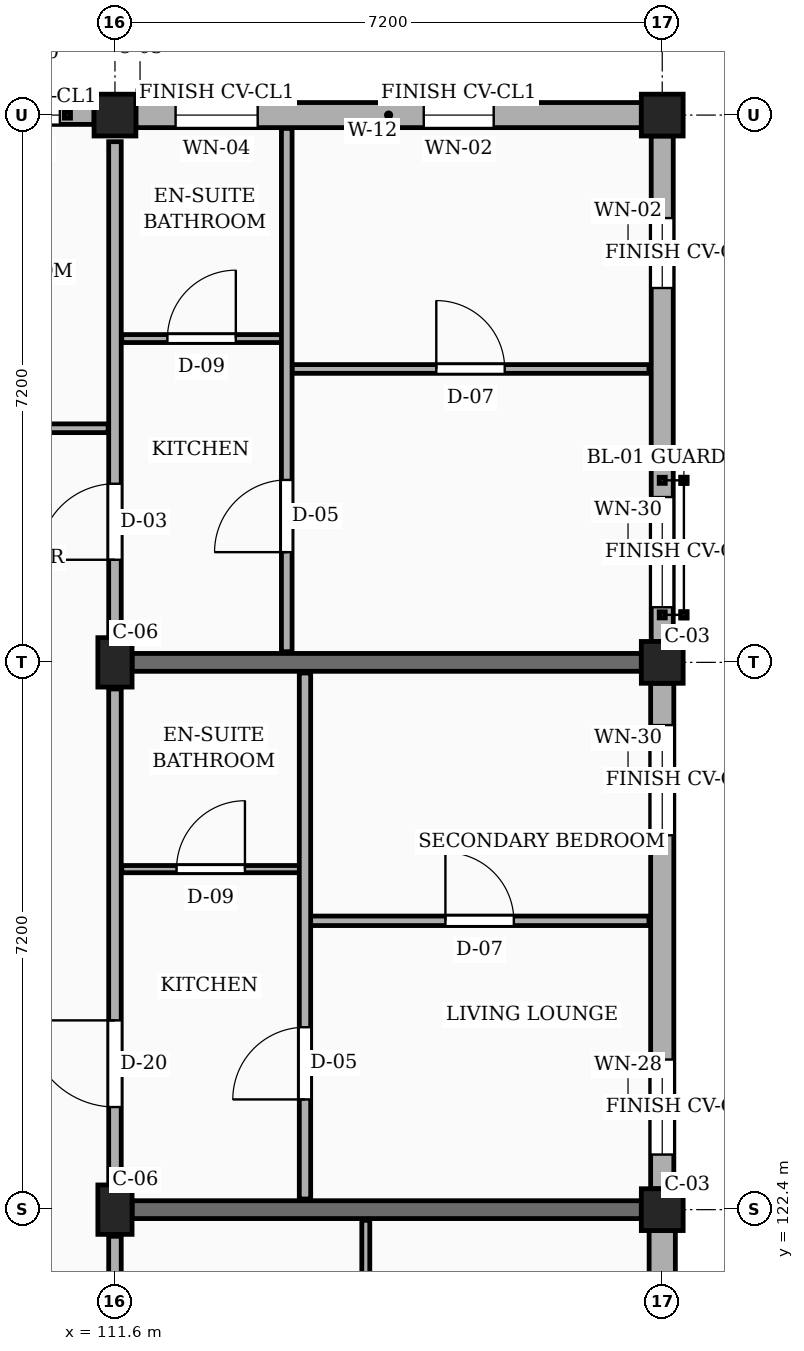
"""IFC4 building model, lengths in metres.
Left out: names, types, materials, properties, quantities, classifications, styles, units other than length and angle.
Written with IfcOpenShell. Run it as: python <this file> out.ifc"""

import sys

from ifc_helpers import new_model, si_unit, direction, frame, frame_2d, origin, origin_2d, place, context, subcontext, project, spatial, rectangle, extrude, element, fill, save


model = new_model("IFC4")
c1 = context("Model", 3, precision=1e-05, world=origin(), true_north=direction((0.0, 1.0)))
c2 = subcontext(c1, "Body", "Model", "MODEL_VIEW")
j1 = project(units=[si_unit("LENGTHUNIT", "METRE"), si_unit("PLANEANGLEUNIT", "RADIAN")], contexts=[c1])
p1 = place(None, origin())
s1 = spatial("IfcSite", under=j1, at=p1, CompositionType="ELEMENT")
p2 = place(p1, origin())
s2 = spatial("IfcBuilding", under=s1, at=p2, CompositionType="ELEMENT")
p3 = place(p2, frame((0.0, 0.0, 13.95)))
s3 = spatial("IfcBuildingStorey", under=s2, at=p3, CompositionType="ELEMENT", Elevation=13.95)
for number, where, z_axis, x_axis in (
    (1, (111.6, 122.4, 0.0), (0.0, 0.0, 1.0), (1.0, 0.0, 0.0)),
    (2, (111.6, 129.6, 0.0), (0.0, 0.0, 1.0), (1.0, 0.0, 0.0)),
):
    element("IfcColumn", number, at=place(p3, frame(where, z_axis=z_axis, x_axis=x_axis)), inside=s3, PredefinedType="COLUMN", context=c2, shape_type="SweptSolid", body=[
        extrude(rectangle(XDim=0.45, YDim=0.65, at=origin_2d()), origin(), (0.0, 0.0, 1.0), 3.15),
    ])
for number, where, z_axis, x_axis in (
    (3, (111.6, 136.8, 0.0), (0.0, 0.0, 1.0), (1.0, 0.0, 0.0)),
    (4, (118.8, 122.4, 0.0), (0.0, 0.0, 1.0), (1.0, 0.0, 0.0)),
    (5, (118.8, 129.6, 0.0), (0.0, 0.0, 1.0), (1.0, 0.0, 0.0)),
    (6, (118.8, 136.8, 0.0), (0.0, 0.0, 1.0), (1.0, 0.0, 0.0)),
):
    element("IfcColumn", number, at=place(p3, frame(where, z_axis=z_axis, x_axis=x_axis)), inside=s3, PredefinedType="COLUMN", context=c2, shape_type="SweptSolid", body=[
        extrude(rectangle(XDim=0.55, YDim=0.55, at=origin_2d()), origin(), (0.0, 0.0, 1.0), 3.15),
    ])
for number, where, z_axis, x_axis in (
    (7, (111.825, 122.4, 0.0), (0.0, 0.0, 1.0), (1.0, 0.0, 0.0)),
    (8, (111.825, 129.6, 0.0), (0.0, 0.0, 1.0), (1.0, 0.0, 0.0)),
):
    element("IfcWall", number, at=place(p3, frame(where, z_axis=z_axis, x_axis=x_axis)), inside=s3, PredefinedType="SOLIDWALL", context=c2, shape_type="SweptSolid", body=[
        extrude(rectangle(XDim=6.7, YDim=0.235, at=frame_2d((3.35, 0.0))), origin(), (0.0, 0.0, 1.0), 2.19),
    ])
p4 = place(p3, frame((118.8, 115.475, 0.0), z_axis=(0.0, 0.0, 1.0), x_axis=(0.0, 1.0, 0.0)))
e9 = element("IfcWall", 9, at=p4, inside=s3, PredefinedType="SOLIDWALL", context=c2, shape_type="SweptSolid", body=[
    extrude(rectangle(XDim=6.65, YDim=0.345, at=frame_2d((3.325, 0.0))), origin(), (0.0, 0.0, 1.0), 2.46),
])
p5 = place(p4, frame((0.45, 0.0, 0.78)))
e10 = element("IfcOpeningElement", 10, at=p5, cuts=e9, PredefinedType="OPENING", context=c2, shape_type="SweptSolid", body=[
    extrude(rectangle(XDim=1.05, YDim=1.44, at=frame_2d((0.525, 0.72))), frame((0.0, 0.183, 0.0), z_axis=(0.0, -1.0, 0.0), x_axis=(1.0, 0.0, 0.0)), (0.0, 0.0, 1.0), 0.365),
])
p6 = place(p4, frame((4.65, 0.0, 0.78)))
e11 = element("IfcOpeningElement", 11, at=p6, cuts=e9, PredefinedType="OPENING", context=c2, shape_type="SweptSolid", body=[
    extrude(rectangle(XDim=1.25, YDim=1.44, at=frame_2d((0.625, 0.72))), frame((0.0, 0.183, 0.0), z_axis=(0.0, -1.0, 0.0), x_axis=(1.0, 0.0, 0.0)), (0.0, 0.0, 1.0), 0.365),
])
p7 = place(p3, frame((118.8, 122.675, 0.0), z_axis=(0.0, 0.0, 1.0), x_axis=(0.0, 1.0, 0.0)))
e12 = element("IfcWall", 12, at=p7, inside=s3, PredefinedType="SOLIDWALL", context=c2, shape_type="SweptSolid", body=[
    extrude(rectangle(XDim=6.65, YDim=0.305, at=frame_2d((3.325, 0.0))), origin(), (0.0, 0.0, 1.0), 2.46),
])
p8 = place(p7, frame((0.45, 0.0, 0.78)))
e13 = element("IfcOpeningElement", 13, at=p8, cuts=e12, PredefinedType="OPENING", context=c2, shape_type="SweptSolid", body=[
    extrude(rectangle(XDim=1.25, YDim=1.44, at=frame_2d((0.625, 0.72))), frame((0.0, 0.163, 0.0), z_axis=(0.0, -1.0, 0.0), x_axis=(1.0, 0.0, 0.0)), (0.0, 0.0, 1.0), 0.325),
])
p9 = place(p7, frame((4.65, 0.0, 0.78)))
e14 = element("IfcOpeningElement", 14, at=p9, cuts=e12, PredefinedType="OPENING", context=c2, shape_type="SweptSolid", body=[
    extrude(rectangle(XDim=1.45, YDim=1.44, at=frame_2d((0.725, 0.72))), frame((0.0, 0.163, 0.0), z_axis=(0.0, -1.0, 0.0), x_axis=(1.0, 0.0, 0.0)), (0.0, 0.0, 1.0), 0.325),
])
p10 = place(p3, frame((118.8, 129.875, 0.0), z_axis=(0.0, 0.0, 1.0), x_axis=(0.0, 1.0, 0.0)))
e15 = element("IfcWall", 15, at=p10, inside=s3, PredefinedType="SOLIDWALL", context=c2, shape_type="SweptSolid", body=[
    extrude(rectangle(XDim=6.65, YDim=0.29, at=frame_2d((3.325, 0.0))), origin(), (0.0, 0.0, 1.0), 2.46),
])
p11 = place(p10, frame((0.45, 0.0, 0.78)))
e16 = element("IfcOpeningElement", 16, at=p11, cuts=e15, PredefinedType="OPENING", context=c2, shape_type="SweptSolid", body=[
    extrude(rectangle(XDim=1.45, YDim=1.44, at=frame_2d((0.725, 0.72))), frame((0.0, 0.155, 0.0), z_axis=(0.0, -1.0, 0.0), x_axis=(1.0, 0.0, 0.0)), (0.0, 0.0, 1.0), 0.31),
])
p12 = place(p10, frame((4.65, 0.0, 0.78)))
e17 = element("IfcOpeningElement", 17, at=p12, cuts=e15, PredefinedType="OPENING", context=c2, shape_type="SweptSolid", body=[
    extrude(rectangle(XDim=0.92, YDim=1.15, at=frame_2d((0.46, 0.575))), frame((0.0, 0.155, 0.0), z_axis=(0.0, -1.0, 0.0), x_axis=(1.0, 0.0, 0.0)), (0.0, 0.0, 1.0), 0.31),
])
p13 = place(p3, frame((118.525, 136.8, 0.0), z_axis=(0.0, 0.0, 1.0), x_axis=(-1.0, 0.0, 0.0)))
e18 = element("IfcWall", 18, at=p13, inside=s3, PredefinedType="SOLIDWALL", context=c2, shape_type="SweptSolid", body=[
    extrude(rectangle(XDim=6.65, YDim=0.33, at=frame_2d((3.325, 0.0))), origin(), (0.0, 0.0, 1.0), 2.46),
])
p14 = place(p13, frame((1.942, 0.0, 0.78)))
e19 = element("IfcOpeningElement", 19, at=p14, cuts=e18, PredefinedType="OPENING", context=c2, shape_type="SweptSolid", body=[
    extrude(rectangle(XDim=0.92, YDim=1.15, at=frame_2d((0.46, 0.575))), frame((0.0, 0.175, 0.0), z_axis=(0.0, -1.0, 0.0), x_axis=(1.0, 0.0, 0.0)), (0.0, 0.0, 1.0), 0.35),
])
p15 = place(p13, frame((5.048, 0.0, 0.78)))
e20 = element("IfcOpeningElement", 20, at=p15, cuts=e18, PredefinedType="OPENING", context=c2, shape_type="SweptSolid", body=[
    extrude(rectangle(XDim=1.08, YDim=1.15, at=frame_2d((0.54, 0.575))), frame((0.0, 0.175, 0.0), z_axis=(0.0, -1.0, 0.0), x_axis=(1.0, 0.0, 0.0)), (0.0, 0.0, 1.0), 0.35),
])
p16 = place(p3, frame((111.325, 136.8, 0.0), z_axis=(0.0, 0.0, 1.0), x_axis=(-1.0, 0.0, 0.0)))
e21 = element("IfcWall", 21, at=p16, inside=s3, PredefinedType="SOLIDWALL", context=c2, shape_type="SweptSolid", body=[
    extrude(rectangle(XDim=6.65, YDim=0.245, at=frame_2d((3.325, 0.0))), origin(), (0.0, 0.0, 1.0), 2.46),
])
p17 = place(p16, frame((0.45, 0.0, 0.78)))
e22 = element("IfcOpeningElement", 22, at=p17, cuts=e21, PredefinedType="OPENING", context=c2, shape_type="SweptSolid", body=[
    extrude(rectangle(XDim=1.08, YDim=1.15, at=frame_2d((0.54, 0.575))), frame((0.0, 0.133, 0.0), z_axis=(0.0, -1.0, 0.0), x_axis=(1.0, 0.0, 0.0)), (0.0, 0.0, 1.0), 0.265),
])
p18 = place(p16, frame((4.65, 0.0, 0.78)))
e23 = element("IfcOpeningElement", 23, at=p18, cuts=e21, PredefinedType="OPENING", context=c2, shape_type="SweptSolid", body=[
    extrude(rectangle(XDim=1.24, YDim=1.15, at=frame_2d((0.62, 0.575))), frame((0.0, 0.133, 0.0), z_axis=(0.0, -1.0, 0.0), x_axis=(1.0, 0.0, 0.0)), (0.0, 0.0, 1.0), 0.265),
])
p19 = place(p3, frame((111.6, 115.55, 0.0), z_axis=(0.0, 0.0, 1.0), x_axis=(0.0, 1.0, 0.0)))
e24 = element("IfcWall", 24, at=p19, inside=s3, PredefinedType="PARTITIONING", context=c2, shape_type="SweptSolid", body=[
    extrude(rectangle(XDim=6.5, YDim=0.165, at=frame_2d((3.25, 0.0))), origin(), (0.0, 0.0, 1.0), 2.325),
])
p20 = place(p19, frame((1.1, 0.0, 0.0)))
e25 = element("IfcOpeningElement", 25, at=p20, cuts=e24, PredefinedType="OPENING", context=c2, shape_type="SweptSolid", body=[
    extrude(rectangle(XDim=0.94, YDim=2.12, at=frame_2d((0.47, 1.06))), frame((0.0, 0.093, 0.0), z_axis=(0.0, -1.0, 0.0), x_axis=(1.0, 0.0, 0.0)), (0.0, 0.0, 1.0), 0.185),
])
p21 = place(p3, frame((111.6, 122.75, 0.0), z_axis=(0.0, 0.0, 1.0), x_axis=(0.0, 1.0, 0.0)))
e26 = element("IfcWall", 26, at=p21, inside=s3, PredefinedType="PARTITIONING", context=c2, shape_type="SweptSolid", body=[
    extrude(rectangle(XDim=6.5, YDim=0.165, at=frame_2d((3.25, 0.0))), origin(), (0.0, 0.0, 1.0), 2.325),
])
p22 = place(p21, frame((1.0, 0.0, 0.0)))
e27 = element("IfcOpeningElement", 27, at=p22, cuts=e26, PredefinedType="OPENING", context=c2, shape_type="SweptSolid", body=[
    extrude(rectangle(XDim=1.14, YDim=2.18, at=frame_2d((0.57, 1.09))), frame((0.0, 0.093, 0.0), z_axis=(0.0, -1.0, 0.0), x_axis=(1.0, 0.0, 0.0)), (0.0, 0.0, 1.0), 0.185),
])
p23 = place(p3, frame((111.6, 129.95, 0.0), z_axis=(0.0, 0.0, 1.0), x_axis=(0.0, 1.0, 0.0)))
e28 = element("IfcWall", 28, at=p23, inside=s3, PredefinedType="PARTITIONING", context=c2, shape_type="SweptSolid", body=[
    extrude(rectangle(XDim=6.5, YDim=0.165, at=frame_2d((3.25, 0.0))), origin(), (0.0, 0.0, 1.0), 2.325),
])
p24 = place(p23, frame((1.0, 0.0, 0.0)))
e29 = element("IfcOpeningElement", 29, at=p24, cuts=e28, PredefinedType="OPENING", context=c2, shape_type="SweptSolid", body=[
    extrude(rectangle(XDim=1.0, YDim=2.15, at=frame_2d((0.5, 1.075))), frame((0.0, 0.093, 0.0), z_axis=(0.0, -1.0, 0.0), x_axis=(1.0, 0.0, 0.0)), (0.0, 0.0, 1.0), 0.185),
])
p25 = place(p3, frame((114.9, 119.07, 0.0), z_axis=(0.0, 0.0, 1.0), x_axis=(0.0, 1.0, 0.0)))
e30 = element("IfcWall", 30, at=p25, inside=s3, PredefinedType="PARTITIONING", context=c2, shape_type="SweptSolid", body=[
    extrude(rectangle(XDim=3.19, YDim=0.105, at=frame_2d((1.595, 0.0))), origin(), (0.0, 0.0, 1.0), 2.325),
])
p26 = place(p3, frame((114.17, 126.2, 0.0), z_axis=(0.0, 0.0, 1.0), x_axis=(1.0, 0.0, 0.0)))
e31 = element("IfcWall", 31, at=p26, inside=s3, PredefinedType="PARTITIONING", context=c2, shape_type="SweptSolid", body=[
    extrude(rectangle(XDim=4.455, YDim=0.125, at=frame_2d((2.228, 0.0))), origin(), (0.0, 0.0, 1.0), 2.325),
])
p27 = place(p26, frame((1.778, 0.0, 0.0)))
e32 = element("IfcOpeningElement", 32, at=p27, cuts=e31, PredefinedType="OPENING", context=c2, shape_type="SweptSolid", body=[
    extrude(rectangle(XDim=0.9, YDim=2.1, at=frame_2d((0.45, 1.05))), frame((0.0, 0.073, 0.0), z_axis=(0.0, -1.0, 0.0), x_axis=(1.0, 0.0, 0.0)), (0.0, 0.0, 1.0), 0.145),
])
p28 = place(p3, frame((111.69, 126.88, 0.0), z_axis=(0.0, 0.0, 1.0), x_axis=(1.0, 0.0, 0.0)))
e33 = element("IfcWall", 33, at=p28, inside=s3, PredefinedType="PARTITIONING", context=c2, shape_type="SweptSolid", body=[
    extrude(rectangle(XDim=2.34, YDim=0.095, at=frame_2d((1.17, 0.0))), origin(), (0.0, 0.0, 1.0), 2.325),
])
p29 = place(p28, frame((0.72, 0.0, 0.0)))
e34 = element("IfcOpeningElement", 34, at=p29, cuts=e33, PredefinedType="OPENING", context=c2, shape_type="SweptSolid", body=[
    extrude(rectangle(XDim=0.9, YDim=2.05, at=frame_2d((0.45, 1.025))), frame((0.0, 0.058, 0.0), z_axis=(0.0, -1.0, 0.0), x_axis=(1.0, 0.0, 0.0)), (0.0, 0.0, 1.0), 0.115),
])
p30 = place(p3, frame((114.1, 122.54, 0.0), z_axis=(0.0, 0.0, 1.0), x_axis=(0.0, 1.0, 0.0)))
e35 = element("IfcWall", 35, at=p30, inside=s3, PredefinedType="PARTITIONING", context=c2, shape_type="SweptSolid", body=[
    extrude(rectangle(XDim=6.92, YDim=0.15, at=frame_2d((3.46, 0.0))), origin(), (0.0, 0.0, 1.0), 2.325),
])
p31 = place(p30, frame((1.31, 0.0, 0.0)))
e36 = element("IfcOpeningElement", 36, at=p31, cuts=e35, PredefinedType="OPENING", context=c2, shape_type="SweptSolid", body=[
    extrude(rectangle(XDim=0.95, YDim=2.1, at=frame_2d((0.475, 1.05))), frame((0.0, 0.085, 0.0), z_axis=(0.0, -1.0, 0.0), x_axis=(1.0, 0.0, 0.0)), (0.0, 0.0, 1.0), 0.17),
])
p32 = place(p3, frame((104.49, 132.68, 0.0), z_axis=(0.0, 0.0, 1.0), x_axis=(1.0, 0.0, 0.0)))
e37 = element("IfcWall", 37, at=p32, inside=s3, PredefinedType="PARTITIONING", context=c2, shape_type="SweptSolid", body=[
    extrude(rectangle(XDim=7.02, YDim=0.115, at=frame_2d((3.51, 0.0))), origin(), (0.0, 0.0, 1.0), 2.325),
])
p33 = place(p32, frame((2.85, 0.0, 0.0)))
e38 = element("IfcOpeningElement", 38, at=p33, cuts=e37, PredefinedType="OPENING", context=c2, shape_type="SweptSolid", body=[
    extrude(rectangle(XDim=1.02, YDim=2.15, at=frame_2d((0.51, 1.075))), frame((0.0, 0.067, 0.0), z_axis=(0.0, -1.0, 0.0), x_axis=(1.0, 0.0, 0.0)), (0.0, 0.0, 1.0), 0.135),
])
p34 = place(p3, frame((113.93, 133.46, 0.0), z_axis=(0.0, 0.0, 1.0), x_axis=(1.0, 0.0, 0.0)))
e39 = element("IfcWall", 39, at=p34, inside=s3, PredefinedType="PARTITIONING", context=c2, shape_type="SweptSolid", body=[
    extrude(rectangle(XDim=4.695, YDim=0.115, at=frame_2d((2.348, 0.0))), origin(), (0.0, 0.0, 1.0), 2.325),
])
p35 = place(p34, frame((1.897, 0.0, 0.0)))
e40 = element("IfcOpeningElement", 40, at=p35, cuts=e39, PredefinedType="OPENING", context=c2, shape_type="SweptSolid", body=[
    extrude(rectangle(XDim=0.9, YDim=2.1, at=frame_2d((0.45, 1.05))), frame((0.0, 0.067, 0.0), z_axis=(0.0, -1.0, 0.0), x_axis=(1.0, 0.0, 0.0)), (0.0, 0.0, 1.0), 0.135),
])
p36 = place(p3, frame((111.69, 133.86, 0.0), z_axis=(0.0, 0.0, 1.0), x_axis=(1.0, 0.0, 0.0)))
e41 = element("IfcWall", 41, at=p36, inside=s3, PredefinedType="PARTITIONING", context=c2, shape_type="SweptSolid", body=[
    extrude(rectangle(XDim=2.1, YDim=0.105, at=frame_2d((1.05, 0.0))), origin(), (0.0, 0.0, 1.0), 2.325),
])
p37 = place(p36, frame((0.6, 0.0, 0.0)))
e42 = element("IfcOpeningElement", 42, at=p37, cuts=e41, PredefinedType="OPENING", context=c2, shape_type="SweptSolid", body=[
    extrude(rectangle(XDim=0.9, YDim=2.05, at=frame_2d((0.45, 1.025))), frame((0.0, 0.062, 0.0), z_axis=(0.0, -1.0, 0.0), x_axis=(1.0, 0.0, 0.0)), (0.0, 0.0, 1.0), 0.125),
])
p38 = place(p3, frame((113.86, 129.74, 0.0), z_axis=(0.0, 0.0, 1.0), x_axis=(0.0, 1.0, 0.0)))
e43 = element("IfcWall", 43, at=p38, inside=s3, PredefinedType="PARTITIONING", context=c2, shape_type="SweptSolid", body=[
    extrude(rectangle(XDim=6.885, YDim=0.14, at=frame_2d((3.442, 0.0))), origin(), (0.0, 0.0, 1.0), 2.325),
])
p39 = place(p38, frame((1.31, 0.0, 0.0)))
e44 = element("IfcOpeningElement", 44, at=p39, cuts=e43, PredefinedType="OPENING", context=c2, shape_type="SweptSolid", body=[
    extrude(rectangle(XDim=0.95, YDim=2.1, at=frame_2d((0.475, 1.05))), frame((0.0, 0.08, 0.0), z_axis=(0.0, -1.0, 0.0), x_axis=(1.0, 0.0, 0.0)), (0.0, 0.0, 1.0), 0.16),
])
p40 = place(p8, origin())
e45 = element("IfcWindow", 45, at=p40, inside=s3, PartitioningType="SINGLE_PANEL", PredefinedType="WINDOW", context=c2, shape_type="SweptSolid", body=[
    extrude(rectangle(XDim=1.25, YDim=1.44, at=frame_2d((0.625, 0.72))), frame((0.0, 0.03, 0.0), z_axis=(0.0, -1.0, 0.0), x_axis=(1.0, 0.0, 0.0)), (0.0, 0.0, 1.0), 0.06),
])
fill(e13, e45)
p41 = place(p9, origin())
e46 = element("IfcWindow", 46, at=p41, inside=s3, PartitioningType="SINGLE_PANEL", PredefinedType="WINDOW", context=c2, shape_type="SweptSolid", body=[
    extrude(rectangle(XDim=1.45, YDim=1.44, at=frame_2d((0.725, 0.72))), frame((0.0, 0.03, 0.0), z_axis=(0.0, -1.0, 0.0), x_axis=(1.0, 0.0, 0.0)), (0.0, 0.0, 1.0), 0.06),
])
fill(e14, e46)
p42 = place(p11, origin())
e47 = element("IfcWindow", 47, at=p42, inside=s3, PartitioningType="SINGLE_PANEL", PredefinedType="WINDOW", context=c2, shape_type="SweptSolid", body=[
    extrude(rectangle(XDim=1.45, YDim=1.44, at=frame_2d((0.725, 0.72))), frame((0.0, 0.03, 0.0), z_axis=(0.0, -1.0, 0.0), x_axis=(1.0, 0.0, 0.0)), (0.0, 0.0, 1.0), 0.06),
])
fill(e16, e47)
p43 = place(p12, origin())
e48 = element("IfcWindow", 48, at=p43, inside=s3, PartitioningType="SINGLE_PANEL", PredefinedType="WINDOW", context=c2, shape_type="SweptSolid", body=[
    extrude(rectangle(XDim=0.92, YDim=1.15, at=frame_2d((0.46, 0.575))), frame((0.0, 0.03, 0.0), z_axis=(0.0, -1.0, 0.0), x_axis=(1.0, 0.0, 0.0)), (0.0, 0.0, 1.0), 0.06),
])
fill(e17, e48)
p44 = place(p14, origin())
e49 = element("IfcWindow", 49, at=p44, inside=s3, PartitioningType="SINGLE_PANEL", PredefinedType="WINDOW", context=c2, shape_type="SweptSolid", body=[
    extrude(rectangle(XDim=0.92, YDim=1.15, at=frame_2d((0.46, 0.575))), frame((0.0, 0.03, 0.0), z_axis=(0.0, -1.0, 0.0), x_axis=(1.0, 0.0, 0.0)), (0.0, 0.0, 1.0), 0.06),
])
fill(e19, e49)
p45 = place(p15, origin())
e50 = element("IfcWindow", 50, at=p45, inside=s3, PartitioningType="SINGLE_PANEL", PredefinedType="WINDOW", context=c2, shape_type="SweptSolid", body=[
    extrude(rectangle(XDim=1.08, YDim=1.15, at=frame_2d((0.54, 0.575))), frame((0.0, 0.03, 0.0), z_axis=(0.0, -1.0, 0.0), x_axis=(1.0, 0.0, 0.0)), (0.0, 0.0, 1.0), 0.06),
])
fill(e20, e50)
p46 = place(p17, origin())
e51 = element("IfcWindow", 51, at=p46, inside=s3, PartitioningType="SINGLE_PANEL", PredefinedType="WINDOW", context=c2, shape_type="SweptSolid", body=[
    extrude(rectangle(XDim=1.08, YDim=1.15, at=frame_2d((0.54, 0.575))), frame((0.0, 0.03, 0.0), z_axis=(0.0, -1.0, 0.0), x_axis=(1.0, 0.0, 0.0)), (0.0, 0.0, 1.0), 0.06),
])
fill(e22, e51)
p47 = place(p22, origin())
e52 = element("IfcDoor", 52, at=p47, inside=s3, OperationType="SINGLE_SWING_RIGHT", PredefinedType="DOOR", context=c2, shape_type="SweptSolid", body=[
    extrude(rectangle(XDim=1.14, YDim=2.18, at=frame_2d((0.57, 1.09))), frame((0.0, 0.025, 0.0), z_axis=(0.0, -1.0, 0.0), x_axis=(1.0, 0.0, 0.0)), (0.0, 0.0, 1.0), 0.05),
])
fill(e27, e52)
p48 = place(p24, origin())
e53 = element("IfcDoor", 53, at=p48, inside=s3, OperationType="SINGLE_SWING_LEFT", PredefinedType="DOOR", context=c2, shape_type="SweptSolid", body=[
    extrude(rectangle(XDim=1.0, YDim=2.15, at=frame_2d((0.5, 1.075))), frame((0.0, 0.025, 0.0), z_axis=(0.0, -1.0, 0.0), x_axis=(1.0, 0.0, 0.0)), (0.0, 0.0, 1.0), 0.05),
])
fill(e29, e53)
p49 = place(p27, origin())
e54 = element("IfcDoor", 54, at=p49, inside=s3, OperationType="SINGLE_SWING_LEFT", PredefinedType="DOOR", context=c2, shape_type="SweptSolid", body=[
    extrude(rectangle(XDim=0.9, YDim=2.1, at=frame_2d((0.45, 1.05))), frame((0.0, 0.025, 0.0), z_axis=(0.0, -1.0, 0.0), x_axis=(1.0, 0.0, 0.0)), (0.0, 0.0, 1.0), 0.05),
])
fill(e32, e54)
p50 = place(p29, origin())
e55 = element("IfcDoor", 55, at=p50, inside=s3, OperationType="SINGLE_SWING_RIGHT", PredefinedType="DOOR", context=c2, shape_type="SweptSolid", body=[
    extrude(rectangle(XDim=0.9, YDim=2.05, at=frame_2d((0.45, 1.025))), frame((0.0, 0.025, 0.0), z_axis=(0.0, -1.0, 0.0), x_axis=(1.0, 0.0, 0.0)), (0.0, 0.0, 1.0), 0.05),
])
fill(e34, e55)
p51 = place(p31, origin())
e56 = element("IfcDoor", 56, at=p51, inside=s3, OperationType="SINGLE_SWING_LEFT", PredefinedType="DOOR", context=c2, shape_type="SweptSolid", body=[
    extrude(rectangle(XDim=0.95, YDim=2.1, at=frame_2d((0.475, 1.05))), frame((0.0, 0.025, 0.0), z_axis=(0.0, -1.0, 0.0), x_axis=(1.0, 0.0, 0.0)), (0.0, 0.0, 1.0), 0.05),
])
fill(e36, e56)
p52 = place(p35, origin())
e57 = element("IfcDoor", 57, at=p52, inside=s3, OperationType="SINGLE_SWING_LEFT", PredefinedType="DOOR", context=c2, shape_type="SweptSolid", body=[
    extrude(rectangle(XDim=0.9, YDim=2.1, at=frame_2d((0.45, 1.05))), frame((0.0, 0.025, 0.0), z_axis=(0.0, -1.0, 0.0), x_axis=(1.0, 0.0, 0.0)), (0.0, 0.0, 1.0), 0.05),
])
fill(e40, e57)
p53 = place(p37, origin())
e58 = element("IfcDoor", 58, at=p53, inside=s3, OperationType="SINGLE_SWING_RIGHT", PredefinedType="DOOR", context=c2, shape_type="SweptSolid", body=[
    extrude(rectangle(XDim=0.9, YDim=2.05, at=frame_2d((0.45, 1.025))), frame((0.0, 0.025, 0.0), z_axis=(0.0, -1.0, 0.0), x_axis=(1.0, 0.0, 0.0)), (0.0, 0.0, 1.0), 0.05),
])
fill(e42, e58)
p54 = place(p39, origin())
e59 = element("IfcDoor", 59, at=p54, inside=s3, OperationType="SINGLE_SWING_LEFT", PredefinedType="DOOR", context=c2, shape_type="SweptSolid", body=[
    extrude(rectangle(XDim=0.95, YDim=2.1, at=frame_2d((0.475, 1.05))), frame((0.0, 0.025, 0.0), z_axis=(0.0, -1.0, 0.0), x_axis=(1.0, 0.0, 0.0)), (0.0, 0.0, 1.0), 0.05),
])
fill(e44, e59)
save(model, sys.argv[1])
